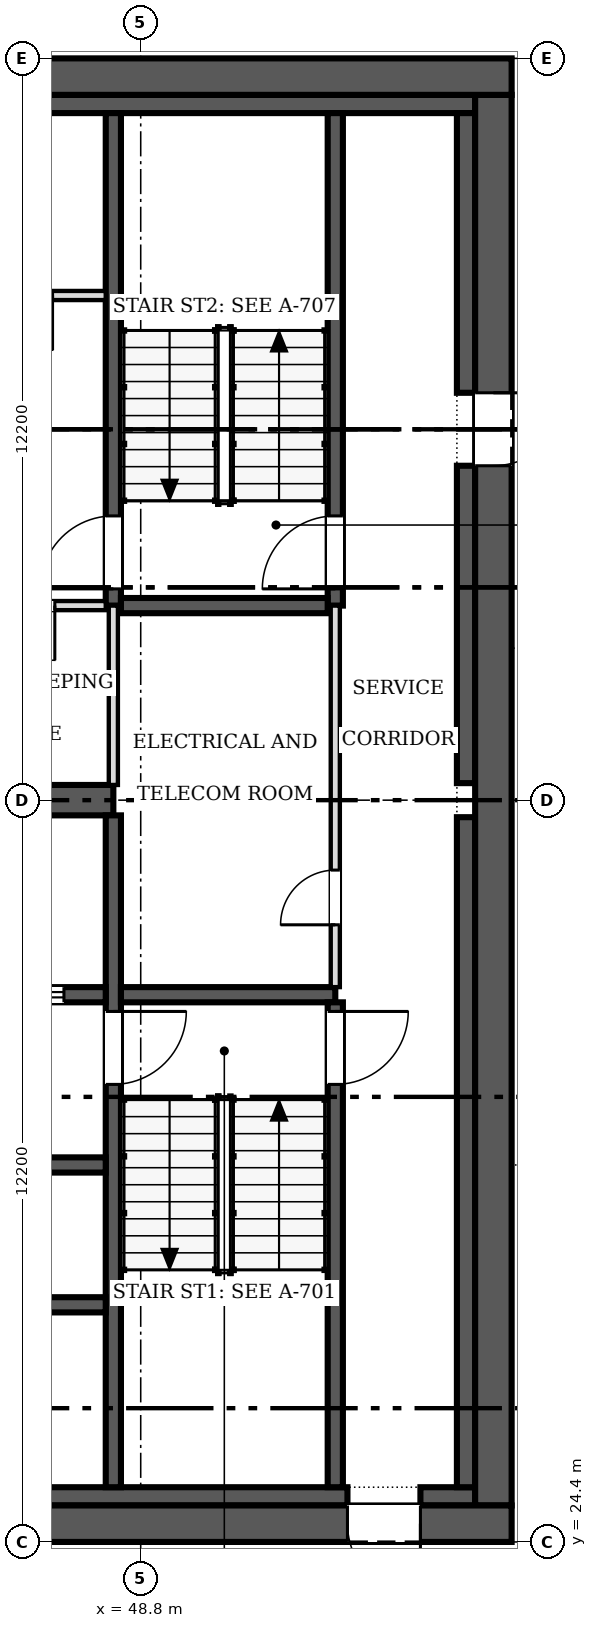
"""IFC4 building model, lengths in metres.
Left out: names, types, materials, properties, quantities, classifications, styles, units other than length and angle.
Written with IfcOpenShell. Run it as: python <this file> out.ifc"""

import sys

from ifc_helpers import new_model, si_unit, direction, frame, frame_2d, origin, place, context, subcontext, project, spatial, rectangle, extrude, source, transform, mapped, element, fill, save


model = new_model("IFC4")
c1 = context("Model", 3, precision=1e-05, world=origin(), true_north=direction((0.0, 1.0)))
c2 = subcontext(c1, "Body", "Model", "MODEL_VIEW")
j1 = project(units=[si_unit("LENGTHUNIT", "METRE"), si_unit("PLANEANGLEUNIT", "RADIAN")], contexts=[c1])
p1 = place(None, origin())
s1 = spatial("IfcSite", under=j1, at=p1, CompositionType="ELEMENT")
p2 = place(p1, origin())
s2 = spatial("IfcBuilding", under=s1, at=p2, CompositionType="ELEMENT")
p3 = place(p2, frame((0.0, 0.0, 155.4)))
s3 = spatial("IfcBuildingStorey", under=s2, at=p3, CompositionType="ELEMENT", Elevation=155.4)
p4 = place(p3, frame((54.9, 24.7, 0.0), z_axis=(0.0, 0.0, 1.0), x_axis=(-1.0, 0.0, 0.0)))
e1 = element("IfcWall", 1, at=p4, inside=s3, PredefinedType="SHEAR", context=c2, shape_type="SweptSolid", body=[
    extrude(rectangle(XDim=24.4, YDim=0.6, at=frame_2d((12.2, 0.0))), origin(), (0.0, 0.0, 1.0), 3.8),
])
m1 = source(origin(), c2, "Body", "SweptSolid", [
    extrude(rectangle(XDim=1.2, YDim=2.1, at=frame_2d((0.6, 1.05))), frame((0.0, 0.31, 0.0), z_axis=(0.0, -1.0, 0.0), x_axis=(1.0, 0.0, 0.0)), (0.0, 0.0, 1.0), 0.62),
])
p5 = place(p4, frame((1.5, 0.0, 0.0)))
e2 = element("IfcOpeningElement", 2, at=p5, cuts=e1, PredefinedType="OPENING", context=c2, shape_type="MappedRepresentation", body=[
    mapped(m1, transform((0.0, 0.0, 0.0), scale=1.0)),
])
p6 = place(p3, frame((30.5, 48.5, 0.0), z_axis=(0.0, 0.0, 1.0), x_axis=(1.0, 0.0, 0.0)))
e3 = element("IfcWall", 3, at=p6, inside=s3, PredefinedType="SHEAR", context=c2, shape_type="SweptSolid", body=[
    extrude(rectangle(XDim=24.4, YDim=0.6, at=frame_2d((12.2, 0.0))), origin(), (0.0, 0.0, 1.0), 3.8),
])
p7 = place(p3, frame((54.6, 48.2, 0.0), z_axis=(0.0, 0.0, 1.0), x_axis=(0.0, -1.0, 0.0)))
e4 = element("IfcWall", 4, at=p7, inside=s3, PredefinedType="SHEAR", context=c2, shape_type="SweptSolid", body=[
    extrude(rectangle(XDim=23.2, YDim=0.6, at=frame_2d((11.6, 0.0))), origin(), (0.0, 0.0, 1.0), 3.8),
])
p8 = place(p7, frame((4.9, 0.0, 0.0)))
e5 = element("IfcOpeningElement", 5, at=p8, cuts=e4, PredefinedType="OPENING", context=c2, shape_type="MappedRepresentation", body=[
    mapped(m1, transform((0.0, 0.0, 0.0), scale=1.0)),
])
p9 = place(p3, frame((31.1, 25.15, 0.0), z_axis=(0.0, 0.0, 1.0), x_axis=(1.0, 0.0, 0.0)))
e6 = element("IfcWall", 6, at=p9, inside=s3, PredefinedType="SOLIDWALL", context=c2, shape_type="SweptSolid", body=[
    extrude(rectangle(XDim=21.1, YDim=0.3, at=frame_2d((10.55, 0.0))), origin(), (0.0, 0.0, 1.0), 3.8),
])
p10 = place(p3, frame((53.4, 25.15, 0.0), z_axis=(0.0, 0.0, 1.0), x_axis=(1.0, 0.0, 0.0)))
e7 = element("IfcWall", 7, at=p10, inside=s3, PredefinedType="SOLIDWALL", context=c2, shape_type="SweptSolid", body=[
    extrude(rectangle(XDim=0.9, YDim=0.3, at=frame_2d((0.45, 0.0))), origin(), (0.0, 0.0, 1.0), 3.8),
])
p11 = place(p3, frame((31.1, 48.05, 0.0), z_axis=(0.0, 0.0, 1.0), x_axis=(1.0, 0.0, 0.0)))
e8 = element("IfcWall", 8, at=p11, inside=s3, PredefinedType="SOLIDWALL", context=c2, shape_type="SweptSolid", body=[
    extrude(rectangle(XDim=23.2, YDim=0.3, at=frame_2d((11.6, 0.0))), origin(), (0.0, 0.0, 1.0), 3.8),
])
p12 = place(p3, frame((54.15, 25.3, 0.0), z_axis=(0.0, 0.0, 1.0), x_axis=(0.0, 1.0, 0.0)))
e9 = element("IfcWall", 9, at=p12, inside=s3, PredefinedType="SOLIDWALL", context=c2, shape_type="SweptSolid", body=[
    extrude(rectangle(XDim=11.02, YDim=0.3, at=frame_2d((5.51, 0.0))), origin(), (0.0, 0.0, 1.0), 3.8),
])
p13 = place(p3, frame((54.15, 36.88, 0.0), z_axis=(0.0, 0.0, 1.0), x_axis=(0.0, 1.0, 0.0)))
e10 = element("IfcWall", 10, at=p13, inside=s3, PredefinedType="SOLIDWALL", context=c2, shape_type="SweptSolid", body=[
    extrude(rectangle(XDim=5.22, YDim=0.3, at=frame_2d((2.61, 0.0))), origin(), (0.0, 0.0, 1.0), 3.8),
])
p14 = place(p3, frame((54.15, 43.3, 0.0), z_axis=(0.0, 0.0, 1.0), x_axis=(0.0, 1.0, 0.0)))
e11 = element("IfcWall", 11, at=p14, inside=s3, PredefinedType="SOLIDWALL", context=c2, shape_type="SweptSolid", body=[
    extrude(rectangle(XDim=4.6, YDim=0.3, at=frame_2d((2.3, 0.0))), origin(), (0.0, 0.0, 1.0), 3.8),
])
p15 = place(p3, frame((31.4, 36.6, 0.0), z_axis=(0.0, 0.0, 1.0), x_axis=(1.0, 0.0, 0.0)))
e12 = element("IfcWall", 12, at=p15, inside=s3, PredefinedType="SHEAR", context=c2, shape_type="SweptSolid", body=[
    extrude(rectangle(XDim=16.95, YDim=0.5, at=frame_2d((8.475, 0.0))), origin(), (0.0, 0.0, 1.0), 3.8),
])
p16 = place(p3, frame((48.35, 36.35, 0.0), z_axis=(0.0, 0.0, 1.0), x_axis=(0.0, -1.0, 0.0)))
e13 = element("IfcWall", 13, at=p16, inside=s3, PredefinedType="SOLIDWALL", context=c2, shape_type="SweptSolid", body=[
    extrude(rectangle(XDim=11.05, YDim=0.25, at=frame_2d((5.525, 0.0))), origin(), (0.0, 0.0, 1.0), 3.8),
])
m2 = source(origin(), c2, "Body", "SweptSolid", [
    extrude(rectangle(XDim=1.2, YDim=2.1, at=frame_2d((0.6, 1.05))), frame((0.0, 0.135, 0.0), z_axis=(0.0, -1.0, 0.0), x_axis=(1.0, 0.0, 0.0)), (0.0, 0.0, 1.0), 0.27),
])
p17 = place(p16, frame((3.225, 0.0, 0.0)))
e14 = element("IfcOpeningElement", 14, at=p17, cuts=e13, PredefinedType="OPENING", context=c2, shape_type="MappedRepresentation", body=[
    mapped(m2, transform((0.0, 0.0, 0.0), scale=1.0)),
])
p18 = place(p3, frame((48.225, 33.4, 0.0), z_axis=(0.0, 0.0, 1.0), x_axis=(-1.0, 0.0, 0.0)))
e15 = element("IfcWall", 15, at=p18, inside=s3, PredefinedType="SOLIDWALL", context=c2, shape_type="SweptSolid", body=[
    extrude(rectangle(XDim=5.275, YDim=0.25, at=frame_2d((2.638, 0.0))), origin(), (0.0, 0.0, 1.0), 3.8),
])
p19 = place(p18, frame((3.512, 0.0, 0.0)))
e16 = element("IfcOpeningElement", 16, at=p19, cuts=e15, PredefinedType="OPENING", context=c2, shape_type="MappedRepresentation", body=[
    mapped(m2, transform((0.0, 0.0, 0.0), scale=1.0)),
])
p20 = place(p18, frame((0.688, 0.0, 0.0)))
e17 = element("IfcOpeningElement", 17, at=p20, cuts=e15, PredefinedType="OPENING", context=c2, shape_type="MappedRepresentation", body=[
    mapped(m2, transform((0.0, 0.0, 0.0), scale=1.0)),
])
p21 = place(p3, frame((48.475, 33.4, 0.0), z_axis=(0.0, 0.0, 1.0), x_axis=(1.0, 0.0, 0.0)))
e18 = element("IfcWall", 18, at=p21, inside=s3, PredefinedType="SOLIDWALL", context=c2, shape_type="SweptSolid", body=[
    extrude(rectangle(XDim=3.525, YDim=0.25, at=frame_2d((1.762, 0.0))), origin(), (0.0, 0.0, 1.0), 3.8),
])
p22 = place(p3, frame((48.35, 47.9, 0.0), z_axis=(0.0, 0.0, 1.0), x_axis=(0.0, -1.0, 0.0)))
e19 = element("IfcWall", 19, at=p22, inside=s3, PredefinedType="SOLIDWALL", context=c2, shape_type="SweptSolid", body=[
    extrude(rectangle(XDim=8.1, YDim=0.25, at=frame_2d((4.05, 0.0))), origin(), (0.0, 0.0, 1.0), 3.8),
])
p23 = place(p22, frame((6.625, 0.0, 0.0)))
e20 = element("IfcOpeningElement", 20, at=p23, cuts=e19, PredefinedType="OPENING", context=c2, shape_type="MappedRepresentation", body=[
    mapped(m2, transform((0.0, 0.0, 0.0), scale=1.0)),
])
p24 = place(p3, frame((52.0, 25.3, 0.0), z_axis=(0.0, 0.0, 1.0), x_axis=(0.0, 1.0, 0.0)))
e21 = element("IfcWall", 21, at=p24, inside=s3, PredefinedType="SOLIDWALL", context=c2, shape_type="SweptSolid", body=[
    extrude(rectangle(XDim=7.975, YDim=0.25, at=frame_2d((3.987, 0.0))), origin(), (0.0, 0.0, 1.0), 3.8),
])
p25 = place(p24, frame((6.625, 0.0, 0.0)))
e22 = element("IfcOpeningElement", 22, at=p25, cuts=e21, PredefinedType="OPENING", context=c2, shape_type="MappedRepresentation", body=[
    mapped(m2, transform((0.0, 0.0, 0.0), scale=1.0)),
])
p26 = place(p3, frame((52.0, 39.8, 0.0), z_axis=(0.0, 0.0, 1.0), x_axis=(0.0, 1.0, 0.0)))
e23 = element("IfcWall", 23, at=p26, inside=s3, PredefinedType="SOLIDWALL", context=c2, shape_type="SweptSolid", body=[
    extrude(rectangle(XDim=8.1, YDim=0.25, at=frame_2d((4.05, 0.0))), origin(), (0.0, 0.0, 1.0), 3.8),
])
p27 = place(p26, frame((0.275, 0.0, 0.0)))
e24 = element("IfcOpeningElement", 24, at=p27, cuts=e23, PredefinedType="OPENING", context=c2, shape_type="MappedRepresentation", body=[
    mapped(m2, transform((0.0, 0.0, 0.0), scale=1.0)),
])
for number, where, z_axis, x_axis in (
    (25, (42.95, 28.3, 0.0), (0.0, 0.0, 1.0), (1.0, 0.0, 0.0)),
    (26, (42.95, 30.6, 0.0), (0.0, 0.0, 1.0), (1.0, 0.0, 0.0)),
):
    element("IfcWall", number, at=place(p3, frame(where, z_axis=z_axis, x_axis=x_axis)), inside=s3, PredefinedType="SOLIDWALL", context=c2, shape_type="SweptSolid", body=[
        extrude(rectangle(XDim=5.275, YDim=0.25, at=frame_2d((2.638, 0.0))), origin(), (0.0, 0.0, 1.0), 3.8),
    ])
p28 = place(p3, frame((48.475, 39.8, 0.0), z_axis=(0.0, 0.0, 1.0), x_axis=(1.0, 0.0, 0.0)))
e27 = element("IfcWall", 27, at=p28, inside=s3, PredefinedType="SOLIDWALL", context=c2, shape_type="SweptSolid", body=[
    extrude(rectangle(XDim=3.4, YDim=0.25, at=frame_2d((1.7, 0.0))), origin(), (0.0, 0.0, 1.0), 3.8),
])
p29 = place(p3, frame((52.0, 33.525, 0.0), z_axis=(0.0, 0.0, 1.0), x_axis=(0.0, 1.0, 0.0)))
e28 = element("IfcWall", 28, at=p29, inside=s3, PredefinedType="PARTITIONING", context=c2, shape_type="SweptSolid", body=[
    extrude(rectangle(XDim=6.275, YDim=0.15, at=frame_2d((3.138, 0.0))), origin(), (0.0, 0.0, 1.0), 3.6),
])
m3 = source(origin(), c2, "Body", "SweptSolid", [
    extrude(rectangle(XDim=0.9, YDim=2.1, at=frame_2d((0.45, 1.05))), frame((0.0, 0.085, 0.0), z_axis=(0.0, -1.0, 0.0), x_axis=(1.0, 0.0, 0.0)), (0.0, 0.0, 1.0), 0.17),
])
p30 = place(p29, frame((1.025, 0.0, 0.0)))
e29 = element("IfcOpeningElement", 29, at=p30, cuts=e28, PredefinedType="OPENING", context=c2, shape_type="MappedRepresentation", body=[
    mapped(m3, transform((0.0, 0.0, 0.0), scale=1.0)),
])
p31 = place(p3, frame((48.225, 39.8, 0.0), z_axis=(0.0, 0.0, 1.0), x_axis=(-1.0, 0.0, 0.0)))
e30 = element("IfcWall", 30, at=p31, inside=s3, PredefinedType="PARTITIONING", context=c2, shape_type="SweptSolid", body=[
    extrude(rectangle(XDim=5.275, YDim=0.15, at=frame_2d((2.638, 0.0))), origin(), (0.0, 0.0, 1.0), 3.6),
])
p32 = place(p31, frame((3.663, 0.0, 0.0)))
e31 = element("IfcOpeningElement", 31, at=p32, cuts=e30, PredefinedType="OPENING", context=c2, shape_type="MappedRepresentation", body=[
    mapped(m3, transform((0.0, 0.0, 0.0), scale=1.0)),
])
p33 = place(p31, frame((0.837, 0.0, 0.0)))
e32 = element("IfcOpeningElement", 32, at=p33, cuts=e30, PredefinedType="OPENING", context=c2, shape_type="MappedRepresentation", body=[
    mapped(m3, transform((0.0, 0.0, 0.0), scale=1.0)),
])
p34 = place(p3, frame((42.95, 44.9, 0.0), z_axis=(0.0, 0.0, 1.0), x_axis=(1.0, 0.0, 0.0)))
e33 = element("IfcWall", 33, at=p34, inside=s3, PredefinedType="PARTITIONING", context=c2, shape_type="SweptSolid", body=[
    extrude(rectangle(XDim=5.275, YDim=0.15, at=frame_2d((2.638, 0.0))), origin(), (0.0, 0.0, 1.0), 3.6),
])
p35 = place(p34, frame((0.712, 0.0, 0.0)))
e34 = element("IfcOpeningElement", 34, at=p35, cuts=e33, PredefinedType="OPENING", context=c2, shape_type="MappedRepresentation", body=[
    mapped(m3, transform((0.0, 0.0, 0.0), scale=1.0)),
])
p36 = place(p34, frame((3.5, 0.0, 0.0)))
e35 = element("IfcOpeningElement", 35, at=p36, cuts=e33, PredefinedType="OPENING", context=c2, shape_type="MappedRepresentation", body=[
    mapped(m3, transform((0.0, 0.0, 0.0), scale=1.0)),
])
p37 = place(p3, frame((48.35, 36.85, 0.0), z_axis=(0.0, 0.0, 1.0), x_axis=(0.0, 1.0, 0.0)))
e36 = element("IfcWall", 36, at=p37, inside=s3, PredefinedType="PARTITIONING", context=c2, shape_type="SweptSolid", body=[
    extrude(rectangle(XDim=2.95, YDim=0.15, at=frame_2d((1.475, 0.0))), origin(), (0.0, 0.0, 1.0), 3.6),
])
m4 = source(origin(), c2, "Body", "SweptSolid", [
    extrude(rectangle(XDim=1.2, YDim=2.1, at=frame_2d((0.6, 1.05))), frame((0.0, 0.025, 0.0), z_axis=(0.0, -1.0, 0.0), x_axis=(1.0, 0.0, 0.0)), (0.0, 0.0, 1.0), 0.05),
])
p38 = place(p5, origin())
e37 = element("IfcDoor", 37, at=p38, inside=s3, OperationType="SINGLE_SWING_LEFT", PredefinedType="DOOR", context=c2, shape_type="MappedRepresentation", body=[
    mapped(m4, transform((0.0, 0.0, 0.0), scale=1.0)),
])
fill(e2, e37)
p39 = place(p8, origin())
e38 = element("IfcDoor", 38, at=p39, inside=s3, OperationType="SINGLE_SWING_LEFT", PredefinedType="DOOR", context=c2, shape_type="MappedRepresentation", body=[
    mapped(m4, transform((0.0, 0.0, 0.0), scale=1.0)),
])
fill(e5, e38)
p40 = place(p17, origin())
e39 = element("IfcDoor", 39, at=p40, inside=s3, OperationType="SINGLE_SWING_LEFT", PredefinedType="DOOR", context=c2, shape_type="MappedRepresentation", body=[
    mapped(m4, transform((0.0, 0.0, 0.0), scale=1.0)),
])
fill(e14, e39)
p41 = place(p20, origin())
e40 = element("IfcDoor", 40, at=p41, inside=s3, OperationType="DOUBLE_DOOR_SLIDING", PredefinedType="DOOR", context=c2, shape_type="MappedRepresentation", body=[
    mapped(m4, transform((0.0, 0.0, 0.0), scale=1.0)),
])
fill(e17, e40)
p42 = place(p23, origin())
e41 = element("IfcDoor", 41, at=p42, inside=s3, OperationType="SINGLE_SWING_RIGHT", PredefinedType="DOOR", context=c2, shape_type="MappedRepresentation", body=[
    mapped(m4, transform((0.0, 0.0, 0.0), scale=1.0)),
])
fill(e20, e41)
p43 = place(p25, origin())
e42 = element("IfcDoor", 42, at=p43, inside=s3, OperationType="SINGLE_SWING_RIGHT", PredefinedType="DOOR", context=c2, shape_type="MappedRepresentation", body=[
    mapped(m4, transform((0.0, 0.0, 0.0), scale=1.0)),
])
fill(e22, e42)
p44 = place(p27, origin())
e43 = element("IfcDoor", 43, at=p44, inside=s3, OperationType="SINGLE_SWING_LEFT", PredefinedType="DOOR", context=c2, shape_type="MappedRepresentation", body=[
    mapped(m4, transform((0.0, 0.0, 0.0), scale=1.0)),
])
fill(e24, e43)
m5 = source(origin(), c2, "Body", "SweptSolid", [
    extrude(rectangle(XDim=0.9, YDim=2.1, at=frame_2d((0.45, 1.05))), frame((0.0, 0.025, 0.0), z_axis=(0.0, -1.0, 0.0), x_axis=(1.0, 0.0, 0.0)), (0.0, 0.0, 1.0), 0.05),
])
p45 = place(p30, origin())
e44 = element("IfcDoor", 44, at=p45, inside=s3, OperationType="SINGLE_SWING_LEFT", PredefinedType="DOOR", context=c2, shape_type="MappedRepresentation", body=[
    mapped(m5, transform((0.0, 0.0, 0.0), scale=1.0)),
])
fill(e29, e44)
p46 = place(p33, origin())
e45 = element("IfcDoor", 45, at=p46, inside=s3, OperationType="SINGLE_SWING_LEFT", PredefinedType="DOOR", context=c2, shape_type="MappedRepresentation", body=[
    mapped(m5, transform((0.0, 0.0, 0.0), scale=1.0)),
])
fill(e32, e45)
save(model, sys.argv[1])
